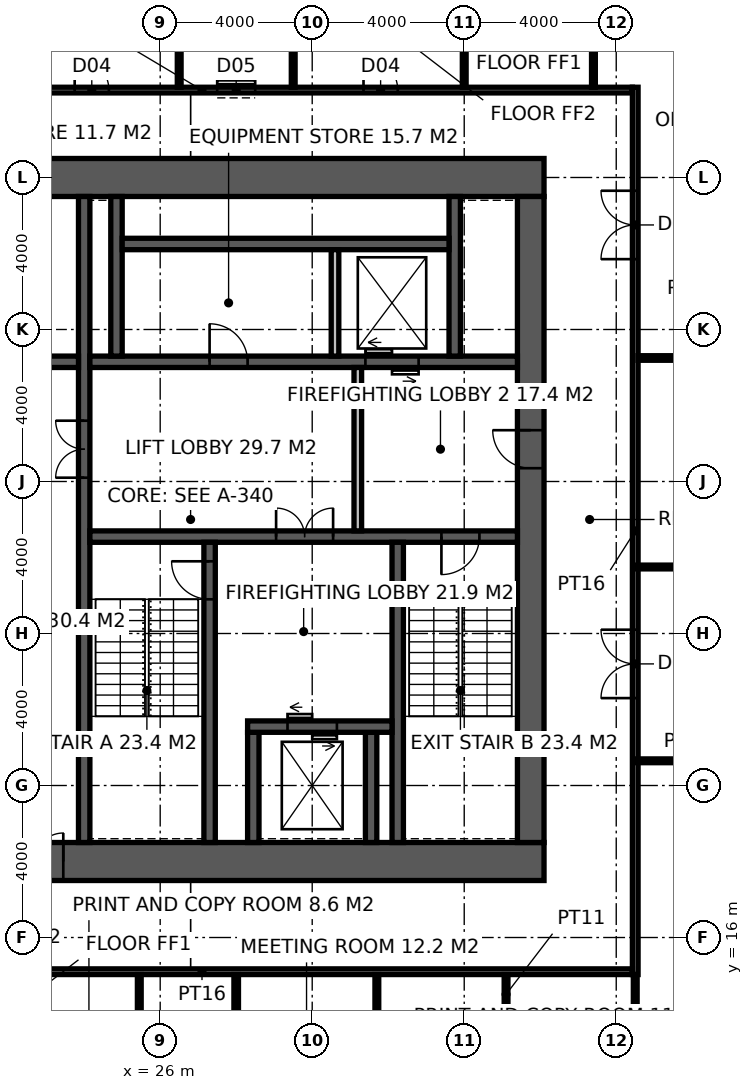
"""IFC4 building model, lengths in metres.
Left out: names, types, materials, properties, quantities, classifications, styles, units other than length and angle.
Written with IfcOpenShell. Run it as: python <this file> out.ifc"""

import sys

from ifc_helpers import new_model, si_unit, direction, frame, frame_2d, origin, place, context, subcontext, project, spatial, rectangle, extrude, element, fill, save


model = new_model("IFC4")
c1 = context("Model", 3, precision=1e-05, world=origin(), true_north=direction((0.0, 1.0)))
c2 = subcontext(c1, "Body", "Model", "MODEL_VIEW")
j1 = project(units=[si_unit("LENGTHUNIT", "METRE"), si_unit("PLANEANGLEUNIT", "RADIAN")], contexts=[c1])
p1 = place(None, origin())
s1 = spatial("IfcSite", under=j1, at=p1, CompositionType="ELEMENT")
p2 = place(p1, origin())
s2 = spatial("IfcBuilding", under=s1, at=p2, CompositionType="ELEMENT")
p3 = place(p2, frame((0.0, 0.0, 254.2)))
s3 = spatial("IfcBuildingStorey", under=s2, at=p3, CompositionType="ELEMENT", Elevation=254.2)
p4 = place(p3, frame((18.5, 18.0, -0.15), z_axis=(0.0, 0.0, 1.0), x_axis=(1.0, 0.0, 0.0)))
e1 = element("IfcWall", 1, at=p4, inside=s3, PredefinedType="SHEAR", context=c2, shape_type="SweptSolid", body=[
    extrude(rectangle(XDim=17.6, YDim=1.0, at=frame_2d((8.8, 0.0))), origin(), (0.0, 0.0, 1.0), 4.0),
])
p5 = place(p4, frame((3.45, 0.0, 0.15)))
e2 = element("IfcOpeningElement", 2, at=p5, cuts=e1, PredefinedType="OPENING", context=c2, shape_type="SweptSolid", body=[
    extrude(rectangle(XDim=1.5, YDim=2.4, at=frame_2d((0.75, 1.2))), frame((0.0, 0.51, 0.0), z_axis=(0.0, -1.0, 0.0), x_axis=(1.0, 0.0, 0.0)), (0.0, 0.0, 1.0), 1.02),
])
p6 = place(p3, frame((18.5, 36.0, -0.15), z_axis=(0.0, 0.0, 1.0), x_axis=(1.0, 0.0, 0.0)))
e3 = element("IfcWall", 3, at=p6, inside=s3, PredefinedType="SHEAR", context=c2, shape_type="SweptSolid", body=[
    extrude(rectangle(XDim=17.6, YDim=1.0, at=frame_2d((8.8, 0.0))), origin(), (0.0, 0.0, 1.0), 4.0),
])
p7 = place(p3, frame((35.75, 18.5, -0.15), z_axis=(0.0, 0.0, 1.0), x_axis=(0.0, 1.0, 0.0)))
e4 = element("IfcWall", 4, at=p7, inside=s3, PredefinedType="SHEAR", context=c2, shape_type="SweptSolid", body=[
    extrude(rectangle(XDim=17.0, YDim=0.7, at=frame_2d((8.5, 0.0))), origin(), (0.0, 0.0, 1.0), 4.0),
])
p8 = place(p7, frame((9.85, 0.0, 0.15)))
e5 = element("IfcOpeningElement", 5, at=p8, cuts=e4, PredefinedType="OPENING", context=c2, shape_type="SweptSolid", body=[
    extrude(rectangle(XDim=1.0, YDim=2.2, at=frame_2d((0.5, 1.1))), frame((0.0, 0.36, 0.0), z_axis=(0.0, -1.0, 0.0), x_axis=(1.0, 0.0, 0.0)), (0.0, 0.0, 1.0), 0.72),
])
p9 = place(p3, frame((24.0, 18.5, -0.15), z_axis=(0.0, 0.0, 1.0), x_axis=(0.0, 1.0, 0.0)))
e6 = element("IfcWall", 6, at=p9, inside=s3, PredefinedType="SHEAR", context=c2, shape_type="SweptSolid", body=[
    extrude(rectangle(XDim=17.0, YDim=0.3, at=frame_2d((8.5, 0.0))), origin(), (0.0, 0.0, 1.0), 4.0),
])
p10 = place(p9, frame((9.6, 0.0, 0.15)))
e7 = element("IfcOpeningElement", 7, at=p10, cuts=e6, PredefinedType="OPENING", context=c2, shape_type="SweptSolid", body=[
    extrude(rectangle(XDim=1.5, YDim=2.4, at=frame_2d((0.75, 1.2))), frame((0.0, 0.16, 0.0), z_axis=(0.0, -1.0, 0.0), x_axis=(1.0, 0.0, 0.0)), (0.0, 0.0, 1.0), 0.32),
])
p11 = place(p3, frame((24.15, 26.55, -0.15), z_axis=(0.0, 0.0, 1.0), x_axis=(1.0, 0.0, 0.0)))
e8 = element("IfcWall", 8, at=p11, inside=s3, PredefinedType="SHEAR", context=c2, shape_type="SweptSolid", body=[
    extrude(rectangle(XDim=11.25, YDim=0.3, at=frame_2d((5.625, 0.0))), origin(), (0.0, 0.0, 1.0), 4.0),
])
p12 = place(p11, frame((9.25, 0.0, 0.15)))
e9 = element("IfcOpeningElement", 9, at=p12, cuts=e8, PredefinedType="OPENING", context=c2, shape_type="SweptSolid", body=[
    extrude(rectangle(XDim=1.0, YDim=2.2, at=frame_2d((0.5, 1.1))), frame((0.0, 0.16, 0.0), z_axis=(0.0, -1.0, 0.0), x_axis=(1.0, 0.0, 0.0)), (0.0, 0.0, 1.0), 0.32),
])
p13 = place(p11, frame((4.9, 0.0, 0.15)))
e10 = element("IfcOpeningElement", 10, at=p13, cuts=e8, PredefinedType="OPENING", context=c2, shape_type="SweptSolid", body=[
    extrude(rectangle(XDim=1.5, YDim=2.4, at=frame_2d((0.75, 1.2))), frame((0.0, 0.16, 0.0), z_axis=(0.0, -1.0, 0.0), x_axis=(1.0, 0.0, 0.0)), (0.0, 0.0, 1.0), 0.32),
])
p14 = place(p3, frame((27.3, 18.5, -0.15), z_axis=(0.0, 0.0, 1.0), x_axis=(0.0, 1.0, 0.0)))
e11 = element("IfcWall", 11, at=p14, inside=s3, PredefinedType="SHEAR", context=c2, shape_type="SweptSolid", body=[
    extrude(rectangle(XDim=7.9, YDim=0.3, at=frame_2d((3.95, 0.0))), origin(), (0.0, 0.0, 1.0), 4.0),
])
p15 = place(p14, frame((6.4, 0.0, 0.15)))
e12 = element("IfcOpeningElement", 12, at=p15, cuts=e11, PredefinedType="OPENING", context=c2, shape_type="SweptSolid", body=[
    extrude(rectangle(XDim=1.0, YDim=2.2, at=frame_2d((0.5, 1.1))), frame((0.0, 0.16, 0.0), z_axis=(0.0, -1.0, 0.0), x_axis=(1.0, 0.0, 0.0)), (0.0, 0.0, 1.0), 0.32),
])
p16 = place(p3, frame((32.25, 18.5, -0.15), z_axis=(0.0, 0.0, 1.0), x_axis=(0.0, 1.0, 0.0)))
e13 = element("IfcWall", 13, at=p16, inside=s3, PredefinedType="SHEAR", context=c2, shape_type="SweptSolid", body=[
    extrude(rectangle(XDim=7.9, YDim=0.3, at=frame_2d((3.95, 0.0))), origin(), (0.0, 0.0, 1.0), 4.0),
])
for number, where, z_axis, x_axis in (
    (14, (28.45, 18.5, -0.15), (0.0, 0.0, 1.0), (0.0, 1.0, 0.0)),
    (15, (31.55, 18.5, -0.15), (0.0, 0.0, 1.0), (0.0, 1.0, 0.0)),
):
    element("IfcWall", number, at=place(p3, frame(where, z_axis=z_axis, x_axis=x_axis)), inside=s3, PredefinedType="SHEAR", context=c2, shape_type="SweptSolid", body=[
        extrude(rectangle(XDim=2.9, YDim=0.3, at=frame_2d((1.45, 0.0))), origin(), (0.0, 0.0, 1.0), 4.0),
    ])
p17 = place(p3, frame((28.3, 21.55, -0.15), z_axis=(0.0, 0.0, 1.0), x_axis=(1.0, 0.0, 0.0)))
e16 = element("IfcWall", 16, at=p17, inside=s3, PredefinedType="SHEAR", context=c2, shape_type="SweptSolid", body=[
    extrude(rectangle(XDim=3.8, YDim=0.3, at=frame_2d((1.9, 0.0))), origin(), (0.0, 0.0, 1.0), 4.0),
])
p18 = place(p17, frame((1.05, 0.0, 0.15)))
e17 = element("IfcOpeningElement", 17, at=p18, cuts=e16, PredefinedType="OPENING", context=c2, shape_type="SweptSolid", body=[
    extrude(rectangle(XDim=1.3, YDim=2.4, at=frame_2d((0.65, 1.2))), frame((0.0, 0.16, 0.0), z_axis=(0.0, -1.0, 0.0), x_axis=(1.0, 0.0, 0.0)), (0.0, 0.0, 1.0), 0.32),
])
p19 = place(p3, frame((24.15, 31.15, -0.15), z_axis=(0.0, 0.0, 1.0), x_axis=(1.0, 0.0, 0.0)))
e18 = element("IfcWall", 18, at=p19, inside=s3, PredefinedType="SHEAR", context=c2, shape_type="SweptSolid", body=[
    extrude(rectangle(XDim=11.25, YDim=0.3, at=frame_2d((5.625, 0.0))), origin(), (0.0, 0.0, 1.0), 4.0),
])
p20 = place(p19, frame((3.15, 0.0, 0.15)))
e19 = element("IfcOpeningElement", 19, at=p20, cuts=e18, PredefinedType="OPENING", context=c2, shape_type="SweptSolid", body=[
    extrude(rectangle(XDim=1.0, YDim=2.2, at=frame_2d((0.5, 1.1))), frame((0.0, 0.16, 0.0), z_axis=(0.0, -1.0, 0.0), x_axis=(1.0, 0.0, 0.0)), (0.0, 0.0, 1.0), 0.32),
])
p21 = place(p19, frame((7.25, 0.0, 0.15)))
e20 = element("IfcOpeningElement", 20, at=p21, cuts=e18, PredefinedType="OPENING", context=c2, shape_type="SweptSolid", body=[
    extrude(rectangle(XDim=1.4, YDim=2.4, at=frame_2d((0.7, 1.2))), frame((0.0, 0.16, 0.0), z_axis=(0.0, -1.0, 0.0), x_axis=(1.0, 0.0, 0.0)), (0.0, 0.0, 1.0), 0.32),
])
p22 = place(p3, frame((18.5, 31.15, -0.15), z_axis=(0.0, 0.0, 1.0), x_axis=(1.0, 0.0, 0.0)))
e21 = element("IfcWall", 21, at=p22, inside=s3, PredefinedType="SHEAR", context=c2, shape_type="SweptSolid", body=[
    extrude(rectangle(XDim=5.35, YDim=0.3, at=frame_2d((2.675, 0.0))), origin(), (0.0, 0.0, 1.0), 4.0),
])
p23 = place(p22, frame((3.4, 0.0, 0.15)))
e22 = element("IfcOpeningElement", 22, at=p23, cuts=e21, PredefinedType="OPENING", context=c2, shape_type="SweptSolid", body=[
    extrude(rectangle(XDim=1.0, YDim=2.2, at=frame_2d((0.5, 1.1))), frame((0.0, 0.16, 0.0), z_axis=(0.0, -1.0, 0.0), x_axis=(1.0, 0.0, 0.0)), (0.0, 0.0, 1.0), 0.32),
])
for number, where, z_axis, x_axis in (
    (23, (24.85, 31.3, -0.15), (0.0, 0.0, 1.0), (0.0, 1.0, 0.0)),
    (24, (33.75, 31.3, -0.15), (0.0, 0.0, 1.0), (0.0, 1.0, 0.0)),
):
    element("IfcWall", number, at=place(p3, frame(where, z_axis=z_axis, x_axis=x_axis)), inside=s3, PredefinedType="SHEAR", context=c2, shape_type="SweptSolid", body=[
        extrude(rectangle(XDim=4.2, YDim=0.3, at=frame_2d((2.1, 0.0))), origin(), (0.0, 0.0, 1.0), 4.0),
    ])
p24 = place(p3, frame((25.0, 34.25, -0.15), z_axis=(0.0, 0.0, 1.0), x_axis=(1.0, 0.0, 0.0)))
e25 = element("IfcWall", 25, at=p24, inside=s3, PredefinedType="SHEAR", context=c2, shape_type="SweptSolid", body=[
    extrude(rectangle(XDim=8.6, YDim=0.3, at=frame_2d((4.3, 0.0))), origin(), (0.0, 0.0, 1.0), 4.0),
])
p25 = place(p3, frame((30.6, 31.3, -0.15), z_axis=(0.0, 0.0, 1.0), x_axis=(0.0, 1.0, 0.0)))
e26 = element("IfcWall", 26, at=p25, inside=s3, PredefinedType="SOLIDWALL", context=c2, shape_type="SweptSolid", body=[
    extrude(rectangle(XDim=2.8, YDim=0.2, at=frame_2d((1.4, 0.0))), origin(), (0.0, 0.0, 1.0), 4.0),
])
p26 = place(p3, frame((31.2, 26.7, 0.0), z_axis=(0.0, 0.0, 1.0), x_axis=(0.0, 1.0, 0.0)))
e27 = element("IfcWall", 27, at=p26, inside=s3, PredefinedType="SOLIDWALL", context=c2, shape_type="SweptSolid", body=[
    extrude(rectangle(XDim=4.3, YDim=0.2, at=frame_2d((2.15, 0.0))), origin(), (0.0, 0.0, 1.0), 3.85),
])
p27 = place(p3, frame((38.5, 15.025, 0.0), z_axis=(0.0, 0.0, 1.0), x_axis=(0.0, 1.0, 0.0)))
e28 = element("IfcWall", 28, at=p27, inside=s3, PredefinedType="PARTITIONING", context=c2, shape_type="SweptSolid", body=[
    extrude(rectangle(XDim=23.35, YDim=0.15, at=frame_2d((11.675, 0.0))), origin(), (0.0, 0.0, 1.0), 3.85),
])
p28 = place(p27, frame((7.275, 0.0, 0.0)))
e29 = element("IfcOpeningElement", 29, at=p28, cuts=e28, PredefinedType="OPENING", context=c2, shape_type="SweptSolid", body=[
    extrude(rectangle(XDim=1.8, YDim=2.4, at=frame_2d((0.9, 1.2))), frame((0.0, 0.085, 0.0), z_axis=(0.0, -1.0, 0.0), x_axis=(1.0, 0.0, 0.0)), (0.0, 0.0, 1.0), 0.17),
])
p29 = place(p27, frame((18.826, 0.0, 0.0)))
e30 = element("IfcOpeningElement", 30, at=p29, cuts=e28, PredefinedType="OPENING", context=c2, shape_type="SweptSolid", body=[
    extrude(rectangle(XDim=1.8, YDim=2.4, at=frame_2d((0.9, 1.2))), frame((0.0, 0.085, 0.0), z_axis=(0.0, -1.0, 0.0), x_axis=(1.0, 0.0, 0.0)), (0.0, 0.0, 1.0), 0.17),
])
p30 = place(p3, frame((15.775, 15.1, 0.0), z_axis=(0.0, 0.0, 1.0), x_axis=(1.0, 0.0, 0.0)))
e31 = element("IfcWall", 31, at=p30, inside=s3, PredefinedType="PARTITIONING", context=c2, shape_type="SweptSolid", body=[
    extrude(rectangle(XDim=22.65, YDim=0.15, at=frame_2d((11.325, 0.0))), origin(), (0.0, 0.0, 1.0), 3.85),
])
p31 = place(p3, frame((15.775, 38.3, 0.0), z_axis=(0.0, 0.0, 1.0), x_axis=(1.0, 0.0, 0.0)))
e32 = element("IfcWall", 32, at=p31, inside=s3, PredefinedType="PARTITIONING", context=c2, shape_type="SweptSolid", body=[
    extrude(rectangle(XDim=22.65, YDim=0.15, at=frame_2d((11.325, 0.0))), origin(), (0.0, 0.0, 1.0), 3.85),
])
p32 = place(p31, frame((7.975, 0.0, 0.0)))
e33 = element("IfcOpeningElement", 33, at=p32, cuts=e32, PredefinedType="OPENING", context=c2, shape_type="SweptSolid", body=[
    extrude(rectangle(XDim=0.9, YDim=2.1, at=frame_2d((0.45, 1.05))), frame((0.0, 0.085, 0.0), z_axis=(0.0, -1.0, 0.0), x_axis=(1.0, 0.0, 0.0)), (0.0, 0.0, 1.0), 0.17),
])
p33 = place(p31, frame((11.725, 0.0, 0.0)))
e34 = element("IfcOpeningElement", 34, at=p33, cuts=e32, PredefinedType="OPENING", context=c2, shape_type="SweptSolid", body=[
    extrude(rectangle(XDim=1.0, YDim=2.1, at=frame_2d((0.5, 1.05))), frame((0.0, 0.085, 0.0), z_axis=(0.0, -1.0, 0.0), x_axis=(1.0, 0.0, 0.0)), (0.0, 0.0, 1.0), 0.17),
])
p34 = place(p31, frame((15.575, 0.0, 0.0)))
e35 = element("IfcOpeningElement", 35, at=p34, cuts=e32, PredefinedType="OPENING", context=c2, shape_type="SweptSolid", body=[
    extrude(rectangle(XDim=0.9, YDim=2.1, at=frame_2d((0.45, 1.05))), frame((0.0, 0.085, 0.0), z_axis=(0.0, -1.0, 0.0), x_axis=(1.0, 0.0, 0.0)), (0.0, 0.0, 1.0), 0.17),
])
p35 = place(p3, frame((34.0, 38.375, 0.0), z_axis=(0.0, 0.0, 1.0), x_axis=(0.0, 1.0, 0.0)))
e36 = element("IfcWall", 36, at=p35, inside=s3, PredefinedType="PARTITIONING", context=c2, shape_type="SweptSolid", body=[
    extrude(rectangle(XDim=3.675, YDim=0.1, at=frame_2d((1.837, 0.0))), origin(), (0.0, 0.0, 1.0), 2.95),
])
for number, where, z_axis, x_axis in (
    (37, (26.5, 38.375, 0.0), (0.0, 0.0, 1.0), (0.0, 1.0, 0.0)),
    (38, (29.5, 38.375, 0.0), (0.0, 0.0, 1.0), (0.0, 1.0, 0.0)),
):
    element("IfcWall", number, at=place(p3, frame(where, z_axis=z_axis, x_axis=x_axis)), inside=s3, PredefinedType="PARTITIONING", context=c2, shape_type="SweptSolid", body=[
        extrude(rectangle(XDim=3.575, YDim=0.1, at=frame_2d((1.788, 0.0))), origin(), (0.0, 0.0, 1.0), 3.85),
    ])
p36 = place(p3, frame((28.0, 4.3, 0.0), z_axis=(0.0, 0.0, 1.0), x_axis=(0.0, 1.0, 0.0)))
e39 = element("IfcWall", 39, at=p36, inside=s3, PredefinedType="PARTITIONING", context=c2, shape_type="SweptSolid", body=[
    extrude(rectangle(XDim=10.725, YDim=0.12, at=frame_2d((5.362, 0.0))), origin(), (0.0, 0.0, 1.0), 3.85),
])
p37 = place(p3, frame((38.575, 31.25, 0.0), z_axis=(0.0, 0.0, 1.0), x_axis=(1.0, 0.0, 0.0)))
e40 = element("IfcWall", 40, at=p37, inside=s3, PredefinedType="PARTITIONING", context=c2, shape_type="SweptSolid", body=[
    extrude(rectangle(XDim=11.125, YDim=0.12, at=frame_2d((5.562, 0.0))), origin(), (0.0, 0.0, 1.0), 3.85),
])
for number, where, z_axis, x_axis in (
    (41, (25.45, 11.55, 0.0), (0.0, 0.0, 1.0), (0.0, 1.0, 0.0)),
    (42, (31.701, 11.55, 0.0), (0.0, 0.0, 1.0), (0.0, 1.0, 0.0)),
    (43, (35.101, 11.55, 0.0), (0.0, 0.0, 1.0), (0.0, 1.0, 0.0)),
):
    element("IfcWall", number, at=place(p3, frame(where, z_axis=z_axis, x_axis=x_axis)), inside=s3, PredefinedType="PARTITIONING", context=c2, shape_type="SweptSolid", body=[
        extrude(rectangle(XDim=3.475, YDim=0.1, at=frame_2d((1.737, 0.0))), origin(), (0.0, 0.0, 1.0), 3.85),
    ])
p38 = place(p3, frame((37.4, 38.375, 0.0), z_axis=(0.0, 0.0, 1.0), x_axis=(0.0, 1.0, 0.0)))
e44 = element("IfcWall", 44, at=p38, inside=s3, PredefinedType="PARTITIONING", context=c2, shape_type="SweptSolid", body=[
    extrude(rectangle(XDim=2.875, YDim=0.1, at=frame_2d((1.438, 0.0))), origin(), (0.0, 0.0, 1.0), 3.85),
])
p39 = place(p3, frame((38.5, 11.55, 0.0), z_axis=(0.0, 0.0, 1.0), x_axis=(0.0, 1.0, 0.0)))
e45 = element("IfcWall", 45, at=p39, inside=s3, PredefinedType="PARTITIONING", context=c2, shape_type="SweptSolid", body=[
    extrude(rectangle(XDim=3.475, YDim=0.1, at=frame_2d((1.737, 0.0))), origin(), (0.0, 0.0, 1.0), 3.85),
])
for number, where, z_axis, x_axis in (
    (46, (38.5, 20.65, 0.0), (0.0, 0.0, 1.0), (1.0, 0.0, 0.0)),
    (47, (43.0, 25.75, 0.0), (0.0, 0.0, 1.0), (-1.0, 0.0, 0.0)),
):
    element("IfcWall", number, at=place(p3, frame(where, z_axis=z_axis, x_axis=x_axis)), inside=s3, PredefinedType="PARTITIONING", context=c2, shape_type="SweptSolid", body=[
        extrude(rectangle(XDim=4.5, YDim=0.1, at=frame_2d((2.25, 0.0))), origin(), (0.0, 0.0, 1.0), 3.85),
    ])
p40 = place(p15, origin())
e48 = element("IfcDoor", 48, at=p40, inside=s3, OperationType="SINGLE_SWING_RIGHT", PredefinedType="DOOR", context=c2, shape_type="SweptSolid", body=[
    extrude(rectangle(XDim=1.0, YDim=2.2, at=frame_2d((0.5, 1.1))), frame((0.0, 0.025, 0.0), z_axis=(0.0, -1.0, 0.0), x_axis=(1.0, 0.0, 0.0)), (0.0, 0.0, 1.0), 0.05),
])
fill(e12, e48)
p41 = place(p12, frame((1.0, 0.0, 0.0), z_axis=(0.0, 0.0, 1.0), x_axis=(-1.0, 0.0, 0.0)))
e49 = element("IfcDoor", 49, at=p41, inside=s3, OperationType="SINGLE_SWING_RIGHT", PredefinedType="DOOR", context=c2, shape_type="SweptSolid", body=[
    extrude(rectangle(XDim=1.0, YDim=2.2, at=frame_2d((0.5, 1.1))), frame((0.0, 0.025, 0.0), z_axis=(0.0, -1.0, 0.0), x_axis=(1.0, 0.0, 0.0)), (0.0, 0.0, 1.0), 0.05),
])
fill(e9, e49)
p42 = place(p8, origin())
e50 = element("IfcDoor", 50, at=p42, inside=s3, OperationType="SINGLE_SWING_RIGHT", PredefinedType="DOOR", context=c2, shape_type="SweptSolid", body=[
    extrude(rectangle(XDim=1.0, YDim=2.2, at=frame_2d((0.5, 1.1))), frame((0.0, 0.025, 0.0), z_axis=(0.0, -1.0, 0.0), x_axis=(1.0, 0.0, 0.0)), (0.0, 0.0, 1.0), 0.05),
])
fill(e5, e50)
p43 = place(p13, origin())
e51 = element("IfcDoor", 51, at=p43, inside=s3, OperationType="DOUBLE_DOOR_DOUBLE_SWING", PredefinedType="DOOR", context=c2, shape_type="SweptSolid", body=[
    extrude(rectangle(XDim=1.5, YDim=2.4, at=frame_2d((0.75, 1.2))), frame((0.0, 0.025, 0.0), z_axis=(0.0, -1.0, 0.0), x_axis=(1.0, 0.0, 0.0)), (0.0, 0.0, 1.0), 0.05),
])
fill(e10, e51)
p44 = place(p10, origin())
e52 = element("IfcDoor", 52, at=p44, inside=s3, OperationType="DOUBLE_DOOR_DOUBLE_SWING", PredefinedType="DOOR", context=c2, shape_type="SweptSolid", body=[
    extrude(rectangle(XDim=1.5, YDim=2.4, at=frame_2d((0.75, 1.2))), frame((0.0, 0.025, 0.0), z_axis=(0.0, -1.0, 0.0), x_axis=(1.0, 0.0, 0.0)), (0.0, 0.0, 1.0), 0.05),
])
fill(e7, e52)
p45 = place(p20, origin())
e53 = element("IfcDoor", 53, at=p45, inside=s3, OperationType="SINGLE_SWING_LEFT", PredefinedType="DOOR", context=c2, shape_type="SweptSolid", body=[
    extrude(rectangle(XDim=1.0, YDim=2.2, at=frame_2d((0.5, 1.1))), frame((0.0, 0.025, 0.0), z_axis=(0.0, -1.0, 0.0), x_axis=(1.0, 0.0, 0.0)), (0.0, 0.0, 1.0), 0.05),
])
fill(e19, e53)
p46 = place(p5, origin())
e54 = element("IfcDoor", 54, at=p46, inside=s3, OperationType="DOUBLE_DOOR_DOUBLE_SWING", PredefinedType="DOOR", context=c2, shape_type="SweptSolid", body=[
    extrude(rectangle(XDim=1.5, YDim=2.4, at=frame_2d((0.75, 1.2))), frame((0.0, 0.025, 0.0), z_axis=(0.0, -1.0, 0.0), x_axis=(1.0, 0.0, 0.0)), (0.0, 0.0, 1.0), 0.05),
])
fill(e2, e54)
p47 = place(p32, origin())
e55 = element("IfcDoor", 55, at=p47, inside=s3, OperationType="SINGLE_SWING_LEFT", PredefinedType="DOOR", context=c2, shape_type="SweptSolid", body=[
    extrude(rectangle(XDim=0.9, YDim=2.1, at=frame_2d((0.45, 1.05))), frame((0.0, 0.025, 0.0), z_axis=(0.0, -1.0, 0.0), x_axis=(1.0, 0.0, 0.0)), (0.0, 0.0, 1.0), 0.05),
])
fill(e33, e55)
p48 = place(p33, origin())
e56 = element("IfcDoor", 56, at=p48, inside=s3, OperationType="SLIDING_TO_LEFT", PredefinedType="DOOR", context=c2, shape_type="SweptSolid", body=[
    extrude(rectangle(XDim=1.0, YDim=2.1, at=frame_2d((0.5, 1.05))), frame((0.0, 0.025, 0.0), z_axis=(0.0, -1.0, 0.0), x_axis=(1.0, 0.0, 0.0)), (0.0, 0.0, 1.0), 0.05),
])
fill(e34, e56)
p49 = place(p34, origin())
e57 = element("IfcDoor", 57, at=p49, inside=s3, OperationType="SINGLE_SWING_LEFT", PredefinedType="DOOR", context=c2, shape_type="SweptSolid", body=[
    extrude(rectangle(XDim=0.9, YDim=2.1, at=frame_2d((0.45, 1.05))), frame((0.0, 0.025, 0.0), z_axis=(0.0, -1.0, 0.0), x_axis=(1.0, 0.0, 0.0)), (0.0, 0.0, 1.0), 0.05),
])
fill(e35, e57)
p50 = place(p28, origin())
e58 = element("IfcDoor", 58, at=p50, inside=s3, OperationType="DOUBLE_DOOR_DOUBLE_SWING", PredefinedType="DOOR", context=c2, shape_type="SweptSolid", body=[
    extrude(rectangle(XDim=1.8, YDim=2.4, at=frame_2d((0.9, 1.2))), frame((0.0, 0.025, 0.0), z_axis=(0.0, -1.0, 0.0), x_axis=(1.0, 0.0, 0.0)), (0.0, 0.0, 1.0), 0.05),
])
fill(e29, e58)
p51 = place(p29, origin())
e59 = element("IfcDoor", 59, at=p51, inside=s3, OperationType="DOUBLE_DOOR_DOUBLE_SWING", PredefinedType="DOOR", context=c2, shape_type="SweptSolid", body=[
    extrude(rectangle(XDim=1.8, YDim=2.4, at=frame_2d((0.9, 1.2))), frame((0.0, 0.025, 0.0), z_axis=(0.0, -1.0, 0.0), x_axis=(1.0, 0.0, 0.0)), (0.0, 0.0, 1.0), 0.05),
])
fill(e30, e59)
p52 = place(p18, origin())
e60 = element("IfcDoor", 60, at=p52, inside=s3, OperationType="DOUBLE_DOOR_SLIDING", PredefinedType="DOOR", context=c2, shape_type="SweptSolid", body=[
    extrude(rectangle(XDim=1.3, YDim=2.4, at=frame_2d((0.65, 1.2))), frame((0.0, 0.025, 0.0), z_axis=(0.0, -1.0, 0.0), x_axis=(1.0, 0.0, 0.0)), (0.0, 0.0, 1.0), 0.05),
])
fill(e17, e60)
p53 = place(p21, origin())
e61 = element("IfcDoor", 61, at=p53, inside=s3, OperationType="DOUBLE_DOOR_SLIDING", PredefinedType="DOOR", context=c2, shape_type="SweptSolid", body=[
    extrude(rectangle(XDim=1.4, YDim=2.4, at=frame_2d((0.7, 1.2))), frame((0.0, 0.025, 0.0), z_axis=(0.0, -1.0, 0.0), x_axis=(1.0, 0.0, 0.0)), (0.0, 0.0, 1.0), 0.05),
])
fill(e20, e61)
save(model, sys.argv[1])
